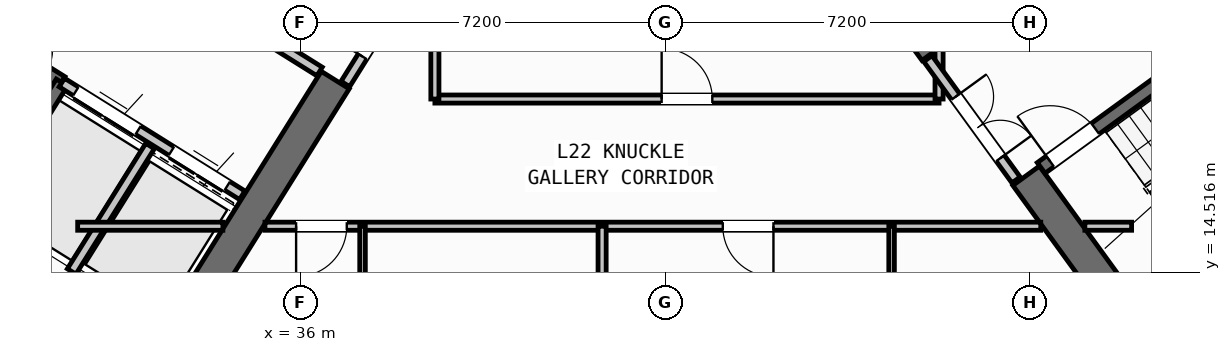
"""IFC4 building model, lengths in metres.
Left out: names, types, materials, properties, quantities, classifications, styles, units other than length and angle.
Written with IfcOpenShell. Run it as: python <this file> out.ifc"""

import sys

from ifc_helpers import new_model, si_unit, direction, frame, frame_2d, origin, place, context, subcontext, project, spatial, rectangle, extrude, source, transform, mapped, element, fill, save


model = new_model("IFC4")
c1 = context("Model", 3, precision=1e-05, world=origin(), true_north=direction((0.0, 1.0)))
c2 = subcontext(c1, "Body", "Model", "MODEL_VIEW")
j1 = project(units=[si_unit("LENGTHUNIT", "METRE"), si_unit("PLANEANGLEUNIT", "RADIAN")], contexts=[c1])
p1 = place(None, origin())
s1 = spatial("IfcSite", under=j1, at=p1, CompositionType="ELEMENT")
p2 = place(p1, origin())
s2 = spatial("IfcBuilding", under=s1, at=p2, CompositionType="ELEMENT")
p3 = place(p2, frame((0.0, 0.0, 90.0)))
s3 = spatial("IfcBuildingStorey", under=s2, at=p3, CompositionType="ELEMENT", Elevation=90.0)
p4 = place(p3, frame((33.409, 12.45, 0.0), z_axis=(0.0, 0.0, 1.0), x_axis=(-0.848051132073, 0.529914405721, 0.0)))
e1 = element("IfcWall", 1, at=p4, inside=s3, PredefinedType="SHEAR", context=c2, shape_type="SweptSolid", body=[
    extrude(rectangle(XDim=13.24, YDim=0.65, at=frame_2d((6.62, 0.0))), origin(), (0.0, 0.0, 1.0), 3.35),
])
p5 = place(p3, frame((36.683, 18.304, 0.0), z_axis=(0.0, 0.0, 1.0), x_axis=(-0.529899109053, -0.848060690178, 0.0)))
e2 = element("IfcWall", 2, at=p5, inside=s3, PredefinedType="SHEAR", context=c2, shape_type="SweptSolid", body=[
    extrude(rectangle(XDim=6.375, YDim=0.65, at=frame_2d((3.188, 0.0))), origin(), (0.0, 0.0, 1.0), 3.35),
])
p6 = place(p3, frame((52.318, 13.11, 0.0), z_axis=(0.0, 0.0, 1.0), x_axis=(0.809019445368, 0.587781878776, 0.0)))
e3 = element("IfcWall", 3, at=p6, inside=s3, PredefinedType="SHEAR", context=c2, shape_type="SweptSolid", body=[
    extrude(rectangle(XDim=12.44, YDim=0.65, at=frame_2d((6.22, 0.0))), origin(), (0.0, 0.0, 1.0), 3.35),
])
p7 = place(p3, frame((52.39, 13.564, 0.0), z_axis=(0.0, 0.0, 1.0), x_axis=(-0.58779688989, 0.809008539037, 0.0)))
e4 = element("IfcWall", 4, at=p7, inside=s3, PredefinedType="SHEAR", context=c2, shape_type="SweptSolid", body=[
    extrude(rectangle(XDim=3.525, YDim=0.65, at=frame_2d((1.763, 0.0))), origin(), (0.0, 0.0, 1.0), 3.35),
])
p8 = place(p3, frame((48.526, 18.884, 0.0), z_axis=(0.0, 0.0, 1.0), x_axis=(-0.58777996584, 0.809020835181, 0.0)))
e5 = element("IfcWall", 5, at=p8, inside=s3, PredefinedType="SHEAR", context=c2, shape_type="SweptSolid", body=[
    extrude(rectangle(XDim=6.375, YDim=0.65, at=frame_2d((3.188, 0.0))), origin(), (0.0, 0.0, 1.0), 3.35),
])
p9 = place(p3, frame((31.76, 12.183, 0.0), z_axis=(0.0, 0.0, 1.0), x_axis=(-0.848047074256, 0.529920899612, 0.0)))
e6 = element("IfcWall", 6, at=p9, inside=s3, PredefinedType="STANDARD", context=c2, shape_type="SweptSolid", body=[
    extrude(rectangle(XDim=30.652, YDim=0.32, at=frame_2d((15.326, 0.0))), origin(), (0.0, 0.0, 1.0), 3.35),
])
p10 = place(p9, frame((15.153, 0.0, 0.0)))
e7 = element("IfcOpeningElement", 7, at=p10, cuts=e6, PredefinedType="OPENING", context=c2, shape_type="SweptSolid", body=[
    extrude(rectangle(XDim=1.2, YDim=2.15, at=frame_2d((0.6, 1.075))), frame((0.0, 0.17, 0.0), z_axis=(0.0, -1.0, 0.0), x_axis=(1.0, 0.0, 0.0)), (0.0, 0.0, 1.0), 0.34),
])
p11 = place(p9, frame((2.002, 0.0, 0.8)))
e8 = element("IfcOpeningElement", 8, at=p11, cuts=e6, PredefinedType="OPENING", context=c2, shape_type="SweptSolid", body=[
    extrude(rectangle(XDim=2.1, YDim=1.55, at=frame_2d((1.05, 0.775))), frame((0.0, 0.17, 0.0), z_axis=(0.0, -1.0, 0.0), x_axis=(1.0, 0.0, 0.0)), (0.0, 0.0, 1.0), 0.34),
])
p12 = place(p9, frame((7.206, 0.0, 0.8)))
e9 = element("IfcOpeningElement", 9, at=p12, cuts=e6, PredefinedType="OPENING", context=c2, shape_type="SweptSolid", body=[
    extrude(rectangle(XDim=2.1, YDim=1.55, at=frame_2d((1.05, 0.775))), frame((0.0, 0.17, 0.0), z_axis=(0.0, -1.0, 0.0), x_axis=(1.0, 0.0, 0.0)), (0.0, 0.0, 1.0), 0.34),
])
p13 = place(p9, frame((12.648, 0.0, 1.0)))
e10 = element("IfcOpeningElement", 10, at=p13, cuts=e6, PredefinedType="OPENING", context=c2, shape_type="SweptSolid", body=[
    extrude(rectangle(XDim=0.9, YDim=1.25, at=frame_2d((0.45, 0.625))), frame((0.0, 0.17, 0.0), z_axis=(0.0, -1.0, 0.0), x_axis=(1.0, 0.0, 0.0)), (0.0, 0.0, 1.0), 0.34),
])
p14 = place(p9, frame((27.974, 0.0, 0.95)))
e11 = element("IfcOpeningElement", 11, at=p14, cuts=e6, PredefinedType="OPENING", context=c2, shape_type="SweptSolid", body=[
    extrude(rectangle(XDim=1.2, YDim=1.4, at=frame_2d((0.6, 0.7))), frame((0.0, 0.17, 0.0), z_axis=(0.0, -1.0, 0.0), x_axis=(1.0, 0.0, 0.0)), (0.0, 0.0, 1.0), 0.34),
])
p15 = place(p9, frame((18.347, 0.0, 1.0)))
e12 = element("IfcOpeningElement", 12, at=p15, cuts=e6, PredefinedType="OPENING", context=c2, shape_type="SweptSolid", body=[
    extrude(rectangle(XDim=0.9, YDim=1.25, at=frame_2d((0.45, 0.625))), frame((0.0, 0.17, 0.0), z_axis=(0.0, -1.0, 0.0), x_axis=(1.0, 0.0, 0.0)), (0.0, 0.0, 1.0), 0.34),
])
p16 = place(p9, frame((20.931, 0.0, 1.0)))
e13 = element("IfcOpeningElement", 13, at=p16, cuts=e6, PredefinedType="OPENING", context=c2, shape_type="SweptSolid", body=[
    extrude(rectangle(XDim=0.65, YDim=1.15, at=frame_2d((0.325, 0.575))), frame((0.0, 0.17, 0.0), z_axis=(0.0, -1.0, 0.0), x_axis=(1.0, 0.0, 0.0)), (0.0, 0.0, 1.0), 0.34),
])
p17 = place(p9, frame((22.938, 0.0, 1.0)))
e14 = element("IfcOpeningElement", 14, at=p17, cuts=e6, PredefinedType="OPENING", context=c2, shape_type="SweptSolid", body=[
    extrude(rectangle(XDim=0.9, YDim=1.25, at=frame_2d((0.45, 0.625))), frame((0.0, 0.17, 0.0), z_axis=(0.0, -1.0, 0.0), x_axis=(1.0, 0.0, 0.0)), (0.0, 0.0, 1.0), 0.34),
])
p18 = place(p9, frame((25.069, 0.0, 1.0)))
e15 = element("IfcOpeningElement", 15, at=p18, cuts=e6, PredefinedType="OPENING", context=c2, shape_type="SweptSolid", body=[
    extrude(rectangle(XDim=0.9, YDim=1.25, at=frame_2d((0.45, 0.625))), frame((0.0, 0.17, 0.0), z_axis=(0.0, -1.0, 0.0), x_axis=(1.0, 0.0, 0.0)), (0.0, 0.0, 1.0), 0.34),
])
p19 = place(p3, frame((31.28, 18.261, 0.0), z_axis=(0.0, 0.0, 1.0), x_axis=(-0.848051618787, 0.529913626805, 0.0)))
e16 = element("IfcWall", 16, at=p19, inside=s3, PredefinedType="SHEAR", context=c2, shape_type="SweptSolid", body=[
    extrude(rectangle(XDim=7.46, YDim=0.26, at=frame_2d((3.73, 0.0))), origin(), (0.0, 0.0, 1.0), 3.35),
])
p20 = place(p19, frame((0.36, 0.0, 0.0)))
e17 = element("IfcOpeningElement", 17, at=p20, cuts=e16, PredefinedType="OPENING", context=c2, shape_type="SweptSolid", body=[
    extrude(rectangle(XDim=0.86, YDim=2.05, at=frame_2d((0.43, 1.025))), frame((0.0, 0.14, 0.0), z_axis=(0.0, -1.0, 0.0), x_axis=(1.0, 0.0, 0.0)), (0.0, 0.0, 1.0), 0.28),
])
p21 = place(p3, frame((31.288, 18.256, 0.0), z_axis=(0.0, 0.0, 1.0), x_axis=(-0.529943379326, -0.848033026897, 0.0)))
e18 = element("IfcWall", 18, at=p21, inside=s3, PredefinedType="SHEAR", context=c2, shape_type="SweptSolid", body=[
    extrude(rectangle(XDim=3.16, YDim=0.26, at=frame_2d((1.58, 0.0))), origin(), (0.0, 0.0, 1.0), 3.35),
])
p22 = place(p3, frame((34.848, 16.031, 0.0), z_axis=(0.0, 0.0, 1.0), x_axis=(-0.848044042236, 0.529925751807, 0.0)))
e19 = element("IfcWall", 19, at=p22, inside=s3, PredefinedType="STANDARD", context=c2, shape_type="SweptSolid", body=[
    extrude(rectangle(XDim=4.198, YDim=0.2, at=frame_2d((2.099, 0.0))), origin(), (0.0, 0.0, 1.0), 3.34),
])
p23 = place(p22, frame((0.348, 0.0, 0.0)))
e20 = element("IfcOpeningElement", 20, at=p23, cuts=e19, PredefinedType="OPENING", context=c2, shape_type="SweptSolid", body=[
    extrude(rectangle(XDim=1.3, YDim=2.2, at=frame_2d((0.65, 1.1))), frame((0.0, 0.11, 0.0), z_axis=(0.0, -1.0, 0.0), x_axis=(1.0, 0.0, 0.0)), (0.0, 0.0, 1.0), 0.22),
])
p24 = place(p22, frame((2.423, 0.0, 0.0)))
e21 = element("IfcOpeningElement", 21, at=p24, cuts=e19, PredefinedType="OPENING", context=c2, shape_type="SweptSolid", body=[
    extrude(rectangle(XDim=1.45, YDim=2.25, at=frame_2d((0.725, 1.125))), frame((0.0, 0.11, 0.0), z_axis=(0.0, -1.0, 0.0), x_axis=(1.0, 0.0, 0.0)), (0.0, 0.0, 1.0), 0.22),
])
p25 = place(p3, frame((36.374, 18.474, 0.0), z_axis=(0.0, 0.0, 1.0), x_axis=(-0.848051071577, 0.529914502535, 0.0)))
e22 = element("IfcWall", 22, at=p25, inside=s3, PredefinedType="STANDARD", context=c2, shape_type="SweptSolid", body=[
    extrude(rectangle(XDim=5.718, YDim=0.2, at=frame_2d((2.859, 0.0))), origin(), (0.0, 0.0, 1.0), 3.34),
])
p26 = place(p25, frame((2.498, 0.0, 0.0)))
e23 = element("IfcOpeningElement", 23, at=p26, cuts=e22, PredefinedType="OPENING", context=c2, shape_type="SweptSolid", body=[
    extrude(rectangle(XDim=1.15, YDim=2.1, at=frame_2d((0.575, 1.05))), frame((0.0, 0.11, 0.0), z_axis=(0.0, -1.0, 0.0), x_axis=(1.0, 0.0, 0.0)), (0.0, 0.0, 1.0), 0.22),
])
p27 = place(p3, frame((33.029, 17.003, 0.0), z_axis=(0.0, 0.0, 1.0), x_axis=(-0.529916267533, -0.848049968695, 0.0)))
e24 = element("IfcWall", 24, at=p27, inside=s3, PredefinedType="STANDARD", context=c2, shape_type="SweptSolid", body=[
    extrude(rectangle(XDim=2.92, YDim=0.2, at=frame_2d((1.46, 0.0))), origin(), (0.0, 0.0, 1.0), 3.34),
])
p28 = place(p3, frame((52.472, 14.013, 0.0), z_axis=(0.0, 0.0, 1.0), x_axis=(0.809028366311, 0.587769599847, 0.0)))
e25 = element("IfcWall", 25, at=p28, inside=s3, PredefinedType="SHEAR", context=c2, shape_type="SweptSolid", body=[
    extrude(rectangle(XDim=7.33, YDim=0.26, at=frame_2d((3.665, 0.0))), origin(), (0.0, 0.0, 1.0), 3.35),
])
p29 = place(p3, frame((50.615, 16.57, 0.0), z_axis=(0.0, 0.0, 1.0), x_axis=(0.809028366311, 0.587769599847, 0.0)))
e26 = element("IfcWall", 26, at=p29, inside=s3, PredefinedType="SHEAR", context=c2, shape_type="SweptSolid", body=[
    extrude(rectangle(XDim=7.33, YDim=0.26, at=frame_2d((3.665, 0.0))), origin(), (0.0, 0.0, 1.0), 3.35),
])
p30 = place(p29, frame((0.22, 0.0, 0.0)))
e27 = element("IfcOpeningElement", 27, at=p30, cuts=e26, PredefinedType="OPENING", context=c2, shape_type="SweptSolid", body=[
    extrude(rectangle(XDim=1.1, YDim=2.1, at=frame_2d((0.55, 1.05))), frame((0.0, 0.14, 0.0), z_axis=(0.0, -1.0, 0.0), x_axis=(1.0, 0.0, 0.0)), (0.0, 0.0, 1.0), 0.28),
])
p31 = place(p3, frame((38.451, 20.737, 0.0), z_axis=(0.0, 0.0, 1.0), x_axis=(-0.529924799939, -0.848044637038, 0.0)))
e28 = element("IfcWall", 28, at=p31, inside=s3, PredefinedType="STANDARD", context=c2, shape_type="SweptSolid", body=[
    extrude(rectangle(XDim=2.96, YDim=0.2, at=frame_2d((1.48, 0.0))), origin(), (0.0, 0.0, 1.0), 3.34),
])
p32 = place(p31, frame((1.46, 0.0, 0.0)))
e29 = element("IfcOpeningElement", 29, at=p32, cuts=e28, PredefinedType="OPENING", context=c2, shape_type="SweptSolid", body=[
    extrude(rectangle(XDim=0.86, YDim=2.05, at=frame_2d((0.43, 1.025))), frame((0.0, 0.11, 0.0), z_axis=(0.0, -1.0, 0.0), x_axis=(1.0, 0.0, 0.0)), (0.0, 0.0, 1.0), 0.22),
])
p33 = place(p3, frame((31.6, 15.42, 0.0), z_axis=(0.0, 0.0, 1.0), x_axis=(1.0, 0.0, 0.0)))
e30 = element("IfcWall", 30, at=p33, inside=s3, PredefinedType="PARTITIONING", context=c2, shape_type="SweptSolid", body=[
    extrude(rectangle(XDim=2.866, YDim=0.16, at=frame_2d((1.433, 0.0))), origin(), (0.0, 0.0, 1.0), 3.34),
])
p34 = place(p3, frame((35.296, 15.42, 0.0), z_axis=(0.0, 0.0, 1.0), x_axis=(1.0, 0.0, 0.0)))
e31 = element("IfcWall", 31, at=p34, inside=s3, PredefinedType="PARTITIONING", context=c2, shape_type="SweptSolid", body=[
    extrude(rectangle(XDim=15.311, YDim=0.16, at=frame_2d((7.655, 0.0))), origin(), (0.0, 0.0, 1.0), 3.34),
])
p35 = place(p34, frame((0.615, 0.0, 0.0)))
e32 = element("IfcOpeningElement", 32, at=p35, cuts=e31, PredefinedType="OPENING", context=c2, shape_type="SweptSolid", body=[
    extrude(rectangle(XDim=1.0, YDim=2.1, at=frame_2d((0.5, 1.05))), frame((0.0, 0.09, 0.0), z_axis=(0.0, -1.0, 0.0), x_axis=(1.0, 0.0, 0.0)), (0.0, 0.0, 1.0), 0.18),
])
p36 = place(p34, frame((9.035, 0.0, 0.0)))
e33 = element("IfcOpeningElement", 33, at=p36, cuts=e31, PredefinedType="OPENING", context=c2, shape_type="SweptSolid", body=[
    extrude(rectangle(XDim=1.0, YDim=2.1, at=frame_2d((0.5, 1.05))), frame((0.0, 0.09, 0.0), z_axis=(0.0, -1.0, 0.0), x_axis=(1.0, 0.0, 0.0)), (0.0, 0.0, 1.0), 0.18),
])
p37 = place(p3, frame((51.477, 15.42, 0.0), z_axis=(0.0, 0.0, 1.0), x_axis=(1.0, 0.0, 0.0)))
e34 = element("IfcWall", 34, at=p37, inside=s3, PredefinedType="PARTITIONING", context=c2, shape_type="SweptSolid", body=[
    extrude(rectangle(XDim=0.923, YDim=0.16, at=frame_2d((0.461, 0.0))), origin(), (0.0, 0.0, 1.0), 3.34),
])
p38 = place(p3, frame((38.65, 17.93, 0.0), z_axis=(0.0, 0.0, 1.0), x_axis=(1.0, 0.0, 0.0)))
e35 = element("IfcWall", 35, at=p38, inside=s3, PredefinedType="PARTITIONING", context=c2, shape_type="SweptSolid", body=[
    extrude(rectangle(XDim=9.95, YDim=0.16, at=frame_2d((4.975, 0.0))), origin(), (0.0, 0.0, 1.0), 3.34),
])
p39 = place(p38, frame((4.475, 0.0, 0.0)))
e36 = element("IfcOpeningElement", 36, at=p39, cuts=e35, PredefinedType="OPENING", context=c2, shape_type="SweptSolid", body=[
    extrude(rectangle(XDim=1.0, YDim=2.1, at=frame_2d((0.5, 1.05))), frame((0.0, 0.09, 0.0), z_axis=(0.0, -1.0, 0.0), x_axis=(1.0, 0.0, 0.0)), (0.0, 0.0, 1.0), 0.18),
])
p40 = place(p3, frame((38.65, 17.93, 0.0), z_axis=(0.0, 0.0, 1.0), x_axis=(0.0, 1.0, 0.0)))
e37 = element("IfcWall", 37, at=p40, inside=s3, PredefinedType="PARTITIONING", context=c2, shape_type="SweptSolid", body=[
    extrude(rectangle(XDim=2.857, YDim=0.16, at=frame_2d((1.428, 0.0))), origin(), (0.0, 0.0, 1.0), 3.34),
])
p41 = place(p3, frame((48.6, 17.93, 0.0), z_axis=(0.0, 0.0, 1.0), x_axis=(0.0, 1.0, 0.0)))
e38 = element("IfcWall", 38, at=p41, inside=s3, PredefinedType="PARTITIONING", context=c2, shape_type="SweptSolid", body=[
    extrude(rectangle(XDim=0.993, YDim=0.16, at=frame_2d((0.496, 0.0))), origin(), (0.0, 0.0, 1.0), 3.34),
])
p42 = place(p3, frame((50.119, 16.333, 0.0), z_axis=(0.0, 0.0, 1.0), x_axis=(-0.587749856981, 0.809042709391, 0.0)))
e39 = element("IfcWall", 39, at=p42, inside=s3, PredefinedType="STANDARD", context=c2, shape_type="SweptSolid", body=[
    extrude(rectangle(XDim=2.96, YDim=0.2, at=frame_2d((1.48, 0.0))), origin(), (0.0, 0.0, 1.0), 3.34),
])
p43 = place(p42, frame((0.53, 0.0, 0.0)))
e40 = element("IfcOpeningElement", 40, at=p43, cuts=e39, PredefinedType="OPENING", context=c2, shape_type="SweptSolid", body=[
    extrude(rectangle(XDim=1.5, YDim=2.15, at=frame_2d((0.75, 1.075))), frame((0.0, 0.11, 0.0), z_axis=(0.0, -1.0, 0.0), x_axis=(1.0, 0.0, 0.0)), (0.0, 0.0, 1.0), 0.22),
])
p44 = place(p3, frame((41.95, 1.96, 0.0), z_axis=(0.0, 0.0, 1.0), x_axis=(0.0, 1.0, 0.0)))
e41 = element("IfcWall", 41, at=p44, inside=s3, PredefinedType="PARTITIONING", context=c2, shape_type="SweptSolid", body=[
    extrude(rectangle(XDim=13.46, YDim=0.16, at=frame_2d((6.73, 0.0))), origin(), (0.0, 0.0, 1.0), 3.34),
])
p45 = place(p3, frame((37.222, 1.96, 0.0), z_axis=(0.0, 0.0, 1.0), x_axis=(0.0, 1.0, 0.0)))
e42 = element("IfcWall", 42, at=p45, inside=s3, PredefinedType="PARTITIONING", context=c2, shape_type="SweptSolid", body=[
    extrude(rectangle(XDim=13.46, YDim=0.11, at=frame_2d((6.73, 0.0))), origin(), (0.0, 0.0, 1.0), 3.34),
])
p46 = place(p45, frame((5.2, 0.0, 0.0)))
e43 = element("IfcOpeningElement", 43, at=p46, cuts=e42, PredefinedType="OPENING", context=c2, shape_type="SweptSolid", body=[
    extrude(rectangle(XDim=0.92, YDim=2.08, at=frame_2d((0.46, 1.04))), frame((0.0, 0.065, 0.0), z_axis=(0.0, -1.0, 0.0), x_axis=(1.0, 0.0, 0.0)), (0.0, 0.0, 1.0), 0.13),
])
p47 = place(p45, frame((10.89, 0.0, 0.0)))
e44 = element("IfcOpeningElement", 44, at=p47, cuts=e42, PredefinedType="OPENING", context=c2, shape_type="SweptSolid", body=[
    extrude(rectangle(XDim=0.88, YDim=2.08, at=frame_2d((0.44, 1.04))), frame((0.0, 0.065, 0.0), z_axis=(0.0, -1.0, 0.0), x_axis=(1.0, 0.0, 0.0)), (0.0, 0.0, 1.0), 0.13),
])
p48 = place(p3, frame((47.663, 1.96, 0.0), z_axis=(0.0, 0.0, 1.0), x_axis=(0.0, 1.0, 0.0)))
e45 = element("IfcWall", 45, at=p48, inside=s3, PredefinedType="PARTITIONING", context=c2, shape_type="SweptSolid", body=[
    extrude(rectangle(XDim=13.46, YDim=0.11, at=frame_2d((6.73, 0.0))), origin(), (0.0, 0.0, 1.0), 3.34),
])
p49 = place(p48, frame((6.3, 0.0, 0.0)))
e46 = element("IfcOpeningElement", 46, at=p49, cuts=e45, PredefinedType="OPENING", context=c2, shape_type="SweptSolid", body=[
    extrude(rectangle(XDim=0.92, YDim=2.08, at=frame_2d((0.46, 1.04))), frame((0.0, 0.065, 0.0), z_axis=(0.0, -1.0, 0.0), x_axis=(1.0, 0.0, 0.0)), (0.0, 0.0, 1.0), 0.13),
])
p50 = place(p48, frame((11.54, 0.0, 0.0)))
e47 = element("IfcOpeningElement", 47, at=p50, cuts=e45, PredefinedType="OPENING", context=c2, shape_type="SweptSolid", body=[
    extrude(rectangle(XDim=0.88, YDim=2.08, at=frame_2d((0.44, 1.04))), frame((0.0, 0.065, 0.0), z_axis=(0.0, -1.0, 0.0), x_axis=(1.0, 0.0, 0.0)), (0.0, 0.0, 1.0), 0.13),
])
m1 = source(origin(), c2, "Body", "SweptSolid", [
    extrude(rectangle(XDim=1.3, YDim=2.2, at=frame_2d((0.65, 1.1))), frame((0.0, 0.025, 0.0), z_axis=(0.0, -1.0, 0.0), x_axis=(1.0, 0.0, 0.0)), (0.0, 0.0, 1.0), 0.05),
])
p51 = place(p23, origin())
e48 = element("IfcDoor", 48, at=p51, inside=s3, OperationType="DOUBLE_DOOR_SLIDING", PredefinedType="DOOR", context=c2, shape_type="MappedRepresentation", body=[
    mapped(m1, transform((0.0, 0.0, 0.0), scale=1.0)),
])
fill(e20, e48)
m2 = source(origin(), c2, "Body", "SweptSolid", [
    extrude(rectangle(XDim=1.45, YDim=2.25, at=frame_2d((0.725, 1.125))), frame((0.0, 0.025, 0.0), z_axis=(0.0, -1.0, 0.0), x_axis=(1.0, 0.0, 0.0)), (0.0, 0.0, 1.0), 0.05),
])
p52 = place(p24, origin())
e49 = element("IfcDoor", 49, at=p52, inside=s3, OperationType="DOUBLE_DOOR_SLIDING", PredefinedType="DOOR", context=c2, shape_type="MappedRepresentation", body=[
    mapped(m2, transform((0.0, 0.0, 0.0), scale=1.0)),
])
fill(e21, e49)
m3 = source(origin(), c2, "Body", "SweptSolid", [
    extrude(rectangle(XDim=1.1, YDim=2.1, at=frame_2d((0.55, 1.05))), frame((0.0, 0.025, 0.0), z_axis=(0.0, -1.0, 0.0), x_axis=(1.0, 0.0, 0.0)), (0.0, 0.0, 1.0), 0.05),
])
p53 = place(p30, origin())
e50 = element("IfcDoor", 50, at=p53, inside=s3, OperationType="SINGLE_SWING_LEFT", PredefinedType="DOOR", context=c2, shape_type="MappedRepresentation", body=[
    mapped(m3, transform((0.0, 0.0, 0.0), scale=1.0)),
])
fill(e27, e50)
m4 = source(origin(), c2, "Body", "SweptSolid", [
    extrude(rectangle(XDim=1.0, YDim=2.1, at=frame_2d((0.5, 1.05))), frame((0.0, 0.025, 0.0), z_axis=(0.0, -1.0, 0.0), x_axis=(1.0, 0.0, 0.0)), (0.0, 0.0, 1.0), 0.05),
])
p54 = place(p39, origin())
e51 = element("IfcDoor", 51, at=p54, inside=s3, OperationType="SINGLE_SWING_LEFT", PredefinedType="DOOR", context=c2, shape_type="MappedRepresentation", body=[
    mapped(m4, transform((0.0, 0.0, 0.0), scale=1.0)),
])
fill(e36, e51)
m5 = source(origin(), c2, "Body", "SweptSolid", [
    extrude(rectangle(XDim=0.86, YDim=2.05, at=frame_2d((0.43, 1.025))), frame((0.0, 0.025, 0.0), z_axis=(0.0, -1.0, 0.0), x_axis=(1.0, 0.0, 0.0)), (0.0, 0.0, 1.0), 0.05),
])
p55 = place(p32, frame((0.86, 0.0, 0.0), z_axis=(0.0, 0.0, 1.0), x_axis=(-1.0, 0.0, 0.0)))
e52 = element("IfcDoor", 52, at=p55, inside=s3, OperationType="SINGLE_SWING_LEFT", PredefinedType="DOOR", context=c2, shape_type="MappedRepresentation", body=[
    mapped(m5, transform((0.0, 0.0, 0.0), scale=1.0)),
])
fill(e29, e52)
m6 = source(origin(), c2, "Body", "SweptSolid", [
    extrude(rectangle(XDim=1.5, YDim=2.15, at=frame_2d((0.75, 1.075))), frame((0.0, 0.025, 0.0), z_axis=(0.0, -1.0, 0.0), x_axis=(1.0, 0.0, 0.0)), (0.0, 0.0, 1.0), 0.05),
])
p56 = place(p43, frame((1.5, 0.0, 0.0), z_axis=(0.0, 0.0, 1.0), x_axis=(-1.0, 0.0, 0.0)))
e53 = element("IfcDoor", 53, at=p56, inside=s3, OperationType="DOUBLE_DOOR_SINGLE_SWING", PredefinedType="DOOR", context=c2, shape_type="MappedRepresentation", body=[
    mapped(m6, transform((0.0, 0.0, 0.0), scale=1.0)),
])
fill(e40, e53)
p57 = place(p35, frame((1.0, 0.0, 0.0), z_axis=(0.0, 0.0, 1.0), x_axis=(-1.0, 0.0, 0.0)))
e54 = element("IfcDoor", 54, at=p57, inside=s3, OperationType="SINGLE_SWING_RIGHT", PredefinedType="DOOR", context=c2, shape_type="MappedRepresentation", body=[
    mapped(m4, transform((0.0, 0.0, 0.0), scale=1.0)),
])
fill(e32, e54)
p58 = place(p36, frame((1.0, 0.0, 0.0), z_axis=(0.0, 0.0, 1.0), x_axis=(-1.0, 0.0, 0.0)))
e55 = element("IfcDoor", 55, at=p58, inside=s3, OperationType="SINGLE_SWING_LEFT", PredefinedType="DOOR", context=c2, shape_type="MappedRepresentation", body=[
    mapped(m4, transform((0.0, 0.0, 0.0), scale=1.0)),
])
fill(e33, e55)
save(model, sys.argv[1])
